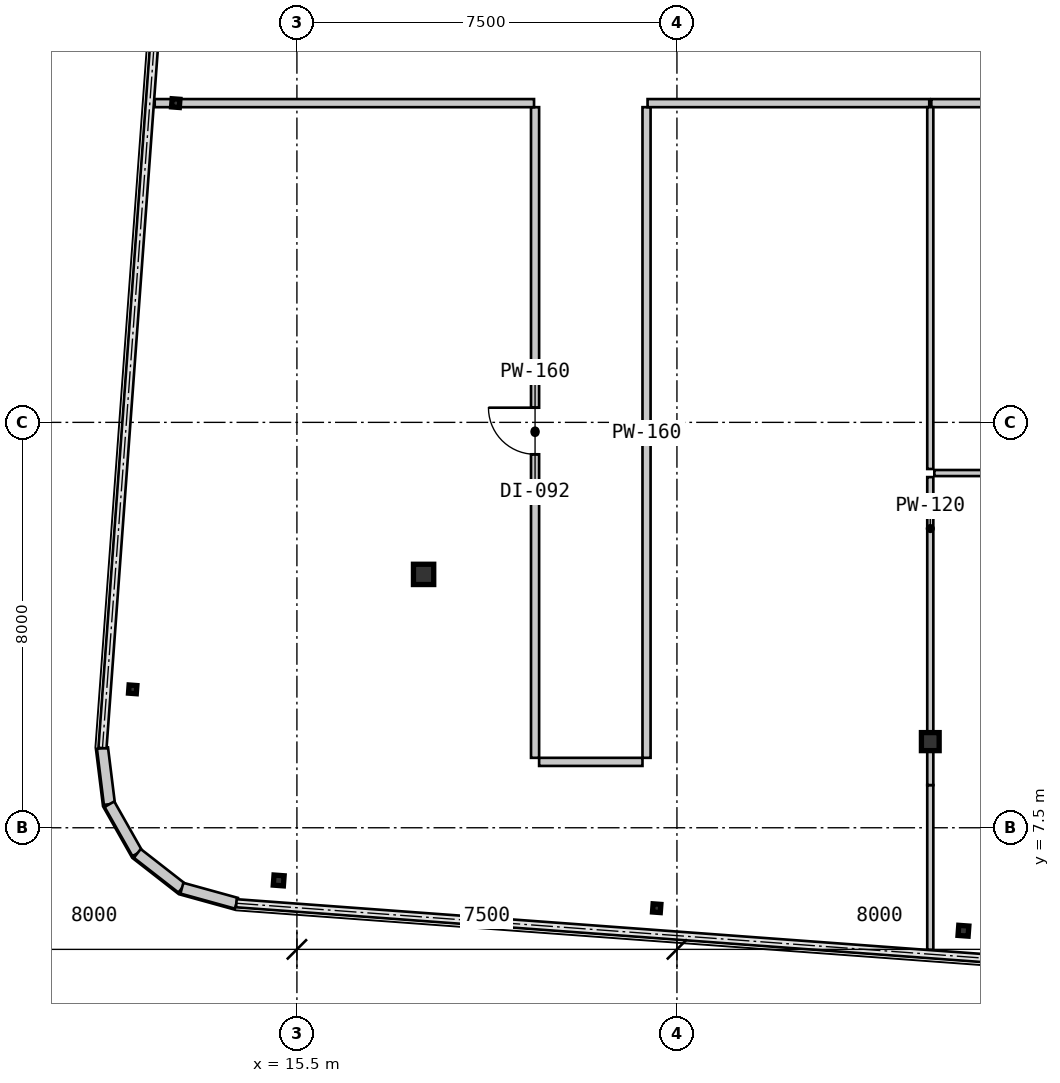
"""IFC4 building model, lengths in metres.
Left out: names, types, materials, properties, quantities, classifications, styles, units other than length and angle.
Written with IfcOpenShell. Run it as: python <this file> out.ifc"""

import sys

from ifc_helpers import new_model, si_unit, direction, frame, frame_2d, origin, origin_2d, place, context, subcontext, project, spatial, rectangle, hollow_rectangle, i_section, extrude, source, transform, mapped, element, fill, save


model = new_model("IFC4")
c1 = context("Model", 3, precision=1e-05, world=origin(), true_north=direction((0.0, 1.0)))
c2 = subcontext(c1, "Body", "Model", "MODEL_VIEW")
j1 = project(units=[si_unit("LENGTHUNIT", "METRE"), si_unit("PLANEANGLEUNIT", "RADIAN")], contexts=[c1])
p1 = place(None, origin())
s1 = spatial("IfcSite", under=j1, at=p1, CompositionType="ELEMENT")
p2 = place(p1, origin())
s2 = spatial("IfcBuilding", under=s1, at=p2, CompositionType="ELEMENT")
p3 = place(p2, frame((0.0, 0.0, 236.6)))
s3 = spatial("IfcBuildingStorey", under=s2, at=p3, CompositionType="ELEMENT", Elevation=236.6)
m1 = source(origin(), c2, "Body", "SweptSolid", [
    extrude(i_section(OverallWidth=0.35, OverallDepth=0.356, WebThickness=0.018, FlangeThickness=0.028, at=origin_2d()), origin(), (0.0, 0.0, 1.0), 3.15),
])
p4 = place(p3, frame((28.0, 9.2, 0.0), z_axis=(0.0, 0.0, 1.0), x_axis=(1.0, 0.0, 0.0)))
e1 = element("IfcColumn", 1, at=p4, inside=s3, PredefinedType="COLUMN", context=c2, shape_type="MappedRepresentation", body=[
    mapped(m1, transform((0.0, 0.0, 0.0), scale=1.0)),
])
m2 = source(origin(), c2, "Body", "SweptSolid", [
    extrude(hollow_rectangle(XDim=0.4, YDim=0.4, WallThickness=0.016, at=origin_2d()), origin(), (0.0, 0.0, 1.0), 3.15),
])
p5 = place(p3, frame((18.0, 12.5, 0.0), z_axis=(0.0, 0.0, 1.0), x_axis=(1.0, 0.0, 0.0)))
e2 = element("IfcColumn", 2, at=p5, inside=s3, PredefinedType="COLUMN", context=c2, shape_type="MappedRepresentation", body=[
    mapped(m2, transform((0.0, 0.0, 0.0), scale=1.0)),
])
m3 = source(origin(), c2, "Body", "SweptSolid", [
    extrude(hollow_rectangle(XDim=0.2, YDim=0.2, WallThickness=0.009, at=origin_2d()), origin(), (0.0, 0.0, 1.0), 3.15),
])
p6 = place(p3, frame((15.141, 6.46, 0.0), z_axis=(0.0, 0.0, 1.0), x_axis=(0.997314477224, -0.073238197128, 0.0)))
e3 = element("IfcColumn", 3, at=p6, inside=s3, PredefinedType="COLUMN", context=c2, shape_type="MappedRepresentation", body=[
    mapped(m3, transform((0.0, 0.0, 0.0), scale=1.0)),
])
m4 = source(origin(), c2, "Body", "SweptSolid", [
    extrude(i_section(OverallWidth=0.154, OverallDepth=0.162, WebThickness=0.008, FlangeThickness=0.011, at=origin_2d()), origin(), (0.0, 0.0, 1.0), 3.15),
])
for number, where, z_axis, x_axis in (
    (4, (22.601, 5.912, 0.0), (0.0, 0.0, 1.0), (0.997, -0.073, 0.0)),
    (5, (12.259, 10.231, 0.0), (0.0, 0.0, 1.0), (0.997, -0.073, 0.0)),
    (6, (13.109, 21.8, 0.0), (0.0, 0.0, 1.0), (0.997, -0.073, 0.0)),
):
    element("IfcColumn", number, at=place(p3, frame(where, z_axis=z_axis, x_axis=x_axis)), inside=s3, PredefinedType="COLUMN", context=c2, shape_type="MappedRepresentation", body=[
        mapped(m4, transform((0.0, 0.0, 0.0), scale=1.0)),
    ])
p7 = place(p3, frame((28.654, 5.468, 0.0), z_axis=(0.0, 0.0, 1.0), x_axis=(0.997314477224, -0.073238197128, 0.0)))
e7 = element("IfcColumn", 7, at=p7, inside=s3, PredefinedType="COLUMN", context=c2, shape_type="MappedRepresentation", body=[
    mapped(m3, transform((0.0, 0.0, 0.0), scale=1.0)),
])
m5 = source(origin(), c2, "Body", "SweptSolid", [
    extrude(rectangle(XDim=1.116, YDim=0.22, at=frame_2d((0.558, 0.0))), origin(), (0.0, 0.0, 1.0), 2.93),
])
for number, where, z_axis, x_axis in (
    (8, (11.663, 9.072, 0.0), (0.0, 0.0, 1.0), (0.123, -0.992, 0.0)),
    (9, (11.8, 7.965, 0.0), (0.0, 0.0, 1.0), (0.493, -0.87, 0.0)),
    (10, (12.35, 6.994, 0.0), (0.0, 0.0, 1.0), (0.789, -0.615, 0.0)),
):
    element("IfcWall", number, at=place(p3, frame(where, z_axis=z_axis, x_axis=x_axis)), inside=s3, PredefinedType="SOLIDWALL", context=c2, shape_type="MappedRepresentation", body=[
        mapped(m5, transform((0.0, 0.0, 0.0), scale=1.0)),
    ])
m6 = source(origin(), c2, "Body", "SweptSolid", [
    extrude(rectangle(XDim=1.116, YDim=0.22, at=frame_2d((0.558, 0.0))), origin(), (0.0, 0.0, 1.0), 2.93),
])
p8 = place(p3, frame((13.23, 6.307, 0.0), z_axis=(0.0, 0.0, 1.0), x_axis=(0.963890028874, -0.266300605026, 0.0)))
e11 = element("IfcWall", 11, at=p8, inside=s3, PredefinedType="SOLIDWALL", context=c2, shape_type="MappedRepresentation", body=[
    mapped(m6, transform((0.0, 0.0, 0.0), scale=1.0)),
])
m7 = source(origin(), c2, "Body", "SweptSolid", [
    extrude(rectangle(XDim=13.959, YDim=0.16, at=frame_2d((6.98, 0.0))), origin(), (0.0, 0.0, 1.0), 2.93),
])
p9 = place(p3, frame((41.98, 21.8, 0.0), z_axis=(0.0, 0.0, 1.0), x_axis=(-1.0, 0.0, 0.0)))
e12 = element("IfcWall", 12, at=p9, inside=s3, PredefinedType="PARTITIONING", context=c2, shape_type="MappedRepresentation", body=[
    mapped(m7, transform((0.0, 0.0, 0.0), scale=1.0)),
])
m8 = source(origin(), c2, "Body", "SweptSolid", [
    extrude(rectangle(XDim=1.05, YDim=2.1, at=frame_2d((0.525, 1.05))), frame((0.0, 0.09, 0.0), z_axis=(0.0, -1.0, 0.0), x_axis=(1.0, 0.0, 0.0)), (0.0, 0.0, 1.0), 0.18),
])
p10 = place(p9, frame((6.455, 0.0, 0.0)))
e13 = element("IfcOpeningElement", 13, at=p10, cuts=e12, PredefinedType="OPENING", context=c2, shape_type="MappedRepresentation", body=[
    mapped(m8, transform((0.0, 0.0, 0.0), scale=1.0)),
])
m9 = source(origin(), c2, "Body", "SweptSolid", [
    extrude(rectangle(XDim=12.84, YDim=0.16, at=frame_2d((6.42, 0.0))), origin(), (0.0, 0.0, 1.0), 2.93),
])
p11 = place(p3, frame((20.2, 8.88, 0.0), z_axis=(0.0, 0.0, 1.0), x_axis=(0.0, 1.0, 0.0)))
e14 = element("IfcWall", 14, at=p11, inside=s3, PredefinedType="PARTITIONING", context=c2, shape_type="MappedRepresentation", body=[
    mapped(m9, transform((0.0, 0.0, 0.0), scale=1.0)),
])
m10 = source(origin(), c2, "Body", "SweptSolid", [
    extrude(rectangle(XDim=0.92, YDim=2.1, at=frame_2d((0.46, 1.05))), frame((0.0, 0.09, 0.0), z_axis=(0.0, -1.0, 0.0), x_axis=(1.0, 0.0, 0.0)), (0.0, 0.0, 1.0), 0.18),
])
p12 = place(p11, frame((5.99, 0.0, 0.0)))
e15 = element("IfcOpeningElement", 15, at=p12, cuts=e14, PredefinedType="OPENING", context=c2, shape_type="MappedRepresentation", body=[
    mapped(m10, transform((0.0, 0.0, 0.0), scale=1.0)),
])
p13 = place(p3, frame((22.4, 21.72, 0.0), z_axis=(0.0, 0.0, 1.0), x_axis=(0.0, -1.0, 0.0)))
e16 = element("IfcWall", 16, at=p13, inside=s3, PredefinedType="PARTITIONING", context=c2, shape_type="MappedRepresentation", body=[
    mapped(m9, transform((0.0, 0.0, 0.0), scale=1.0)),
])
m11 = source(origin(), c2, "Body", "SweptSolid", [
    extrude(rectangle(XDim=7.486, YDim=0.16, at=frame_2d((3.743, 0.0))), origin(), (0.0, 0.0, 1.0), 2.93),
])
p14 = place(p3, frame((20.18, 21.8, 0.0), z_axis=(0.0, 0.0, 1.0), x_axis=(-1.0, 0.0, 0.0)))
e17 = element("IfcWall", 17, at=p14, inside=s3, PredefinedType="PARTITIONING", context=c2, shape_type="MappedRepresentation", body=[
    mapped(m11, transform((0.0, 0.0, 0.0), scale=1.0)),
])
m12 = source(origin(), c2, "Body", "SweptSolid", [
    extrude(rectangle(XDim=5.559, YDim=0.16, at=frame_2d((2.78, 0.0))), origin(), (0.0, 0.0, 1.0), 2.93),
])
p15 = place(p3, frame((27.98, 21.8, 0.0), z_axis=(0.0, 0.0, 1.0), x_axis=(-1.0, 0.0, 0.0)))
e18 = element("IfcWall", 18, at=p15, inside=s3, PredefinedType="PARTITIONING", context=c2, shape_type="MappedRepresentation", body=[
    mapped(m12, transform((0.0, 0.0, 0.0), scale=1.0)),
])
m13 = source(origin(), c2, "Body", "SweptSolid", [
    extrude(rectangle(XDim=2.04, YDim=0.16, at=frame_2d((1.02, 0.0))), origin(), (0.0, 0.0, 1.0), 2.93),
])
p16 = place(p3, frame((22.32, 8.8, 0.0), z_axis=(0.0, 0.0, 1.0), x_axis=(-1.0, 0.0, 0.0)))
e19 = element("IfcWall", 19, at=p16, inside=s3, PredefinedType="PARTITIONING", context=c2, shape_type="MappedRepresentation", body=[
    mapped(m13, transform((0.0, 0.0, 0.0), scale=1.0)),
])
m14 = source(origin(), c2, "Body", "SweptSolid", [
    extrude(rectangle(XDim=13.84, YDim=0.12, at=frame_2d((6.92, 0.0))), origin(), (0.0, 0.0, 1.0), 2.93),
])
p17 = place(p3, frame((28.08, 14.5, 0.0), z_axis=(0.0, 0.0, 1.0), x_axis=(1.0, 0.0, 0.0)))
e20 = element("IfcWall", 20, at=p17, inside=s3, PredefinedType="PARTITIONING", context=c2, shape_type="MappedRepresentation", body=[
    mapped(m14, transform((0.0, 0.0, 0.0), scale=1.0)),
])
m15 = source(origin(), c2, "Body", "SweptSolid", [
    extrude(rectangle(XDim=0.86, YDim=2.1, at=frame_2d((0.43, 1.05))), frame((0.0, 0.07, 0.0), z_axis=(0.0, -1.0, 0.0), x_axis=(1.0, 0.0, 0.0)), (0.0, 0.0, 1.0), 0.14),
])
p18 = place(p17, frame((6.49, 0.0, 0.0)))
e21 = element("IfcOpeningElement", 21, at=p18, cuts=e20, PredefinedType="OPENING", context=c2, shape_type="MappedRepresentation", body=[
    mapped(m15, transform((0.0, 0.0, 0.0), scale=1.0)),
])
m16 = source(origin(), c2, "Body", "SweptSolid", [
    extrude(rectangle(XDim=3.253, YDim=0.12, at=frame_2d((1.627, 0.0))), origin(), (0.0, 0.0, 1.0), 2.93),
])
p19 = place(p3, frame((28.0, 5.089, 0.0), z_axis=(0.0, 0.0, 1.0), x_axis=(0.0, 1.0, 0.0)))
e22 = element("IfcWall", 22, at=p19, inside=s3, PredefinedType="PARTITIONING", context=c2, shape_type="MappedRepresentation", body=[
    mapped(m16, transform((0.0, 0.0, 0.0), scale=1.0)),
])
m17 = source(origin(), c2, "Body", "SweptSolid", [
    extrude(rectangle(XDim=0.858, YDim=0.12, at=frame_2d((0.429, 0.0))), origin(), (0.0, 0.0, 1.0), 2.524),
])
p20 = place(p3, frame((28.0, 8.342, 0.0), z_axis=(0.0, 0.0, 1.0), x_axis=(0.0, 1.0, 0.0)))
e23 = element("IfcWall", 23, at=p20, inside=s3, PredefinedType="PARTITIONING", context=c2, shape_type="MappedRepresentation", body=[
    mapped(m17, transform((0.0, 0.0, 0.0), scale=1.0)),
])
m18 = source(origin(), c2, "Body", "SweptSolid", [
    extrude(rectangle(XDim=5.22, YDim=0.12, at=frame_2d((2.61, 0.0))), origin(), (0.0, 0.0, 1.0), 2.328),
])
p21 = place(p3, frame((28.0, 9.2, 0.0), z_axis=(0.0, 0.0, 1.0), x_axis=(0.0, 1.0, 0.0)))
e24 = element("IfcWall", 24, at=p21, inside=s3, PredefinedType="PARTITIONING", context=c2, shape_type="MappedRepresentation", body=[
    mapped(m18, transform((0.0, 0.0, 0.0), scale=1.0)),
])
m19 = source(origin(), c2, "Body", "SweptSolid", [
    extrude(rectangle(XDim=7.14, YDim=0.12, at=frame_2d((3.57, 0.0))), origin(), (0.0, 0.0, 1.0), 2.328),
])
p22 = place(p3, frame((28.0, 14.58, 0.0), z_axis=(0.0, 0.0, 1.0), x_axis=(0.0, 1.0, 0.0)))
e25 = element("IfcWall", 25, at=p22, inside=s3, PredefinedType="PARTITIONING", context=c2, shape_type="MappedRepresentation", body=[
    mapped(m19, transform((0.0, 0.0, 0.0), scale=1.0)),
])
m20 = source(origin(), c2, "Body", "SweptSolid", [
    extrude(rectangle(XDim=0.92, YDim=2.1, at=frame_2d((0.46, 1.05))), frame((0.0, 0.025, 0.0), z_axis=(0.0, -1.0, 0.0), x_axis=(1.0, 0.0, 0.0)), (0.0, 0.0, 1.0), 0.05),
])
p23 = place(p12, origin())
e26 = element("IfcDoor", 26, at=p23, inside=s3, OperationType="SINGLE_SWING_RIGHT", PredefinedType="DOOR", context=c2, shape_type="MappedRepresentation", body=[
    mapped(m20, transform((0.0, 0.0, 0.0), scale=1.0)),
])
fill(e15, e26)
save(model, sys.argv[1])
